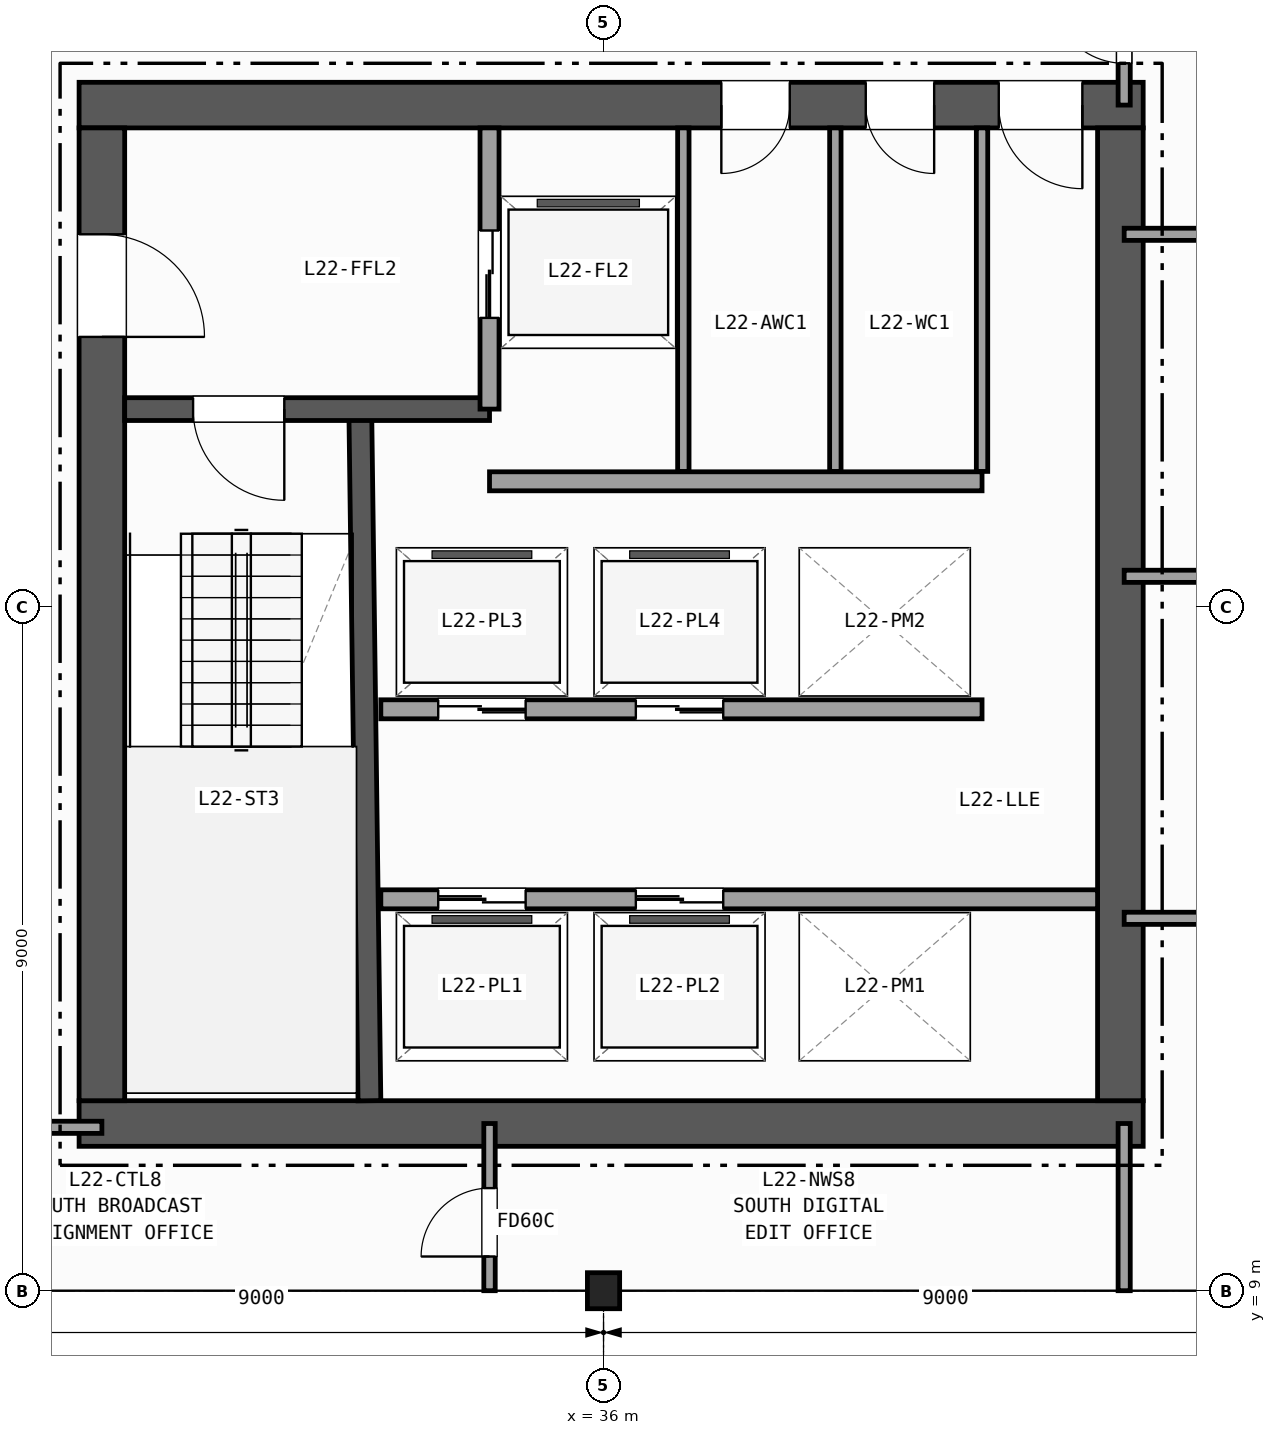
"""IFC4 building model, lengths in metres.
Left out: names, types, materials, properties, quantities, classifications, styles, units other than length and angle.
Written with IfcOpenShell. Run it as: python <this file> out.ifc"""

import sys

from ifc_helpers import new_model, si_unit, direction, frame, frame_2d, origin, origin_2d, place, context, subcontext, project, spatial, rectangle, i_section, extrude, element, fill, save


model = new_model("IFC4")
c1 = context("Model", 3, precision=1e-05, world=origin(), true_north=direction((0.0, 1.0)))
c2 = subcontext(c1, "Body", "Model", "MODEL_VIEW")
j1 = project(units=[si_unit("LENGTHUNIT", "METRE"), si_unit("PLANEANGLEUNIT", "RADIAN")], contexts=[c1])
p1 = place(None, origin())
s1 = spatial("IfcSite", under=j1, at=p1, CompositionType="ELEMENT")
p2 = place(p1, origin())
s2 = spatial("IfcBuilding", under=s1, at=p2, CompositionType="ELEMENT")
p3 = place(p2, frame((0.0, 0.0, 92.8)))
s3 = spatial("IfcBuildingStorey", under=s2, at=p3, CompositionType="ELEMENT", Elevation=92.8)
p4 = place(p3, frame((36.0, 9.0, 0.0), z_axis=(0.0, 0.0, 1.0), x_axis=(1.0, 0.0, 0.0)))
e1 = element("IfcColumn", 1, at=p4, inside=s3, PredefinedType="COLUMN", context=c2, shape_type="SweptSolid", body=[
    extrude(i_section(OverallWidth=0.424, OverallDepth=0.474, WebThickness=0.048, FlangeThickness=0.077, FilletRadius=0.015, at=origin_2d()), origin(), (0.0, 0.0, 1.0), 3.7),
])
p5 = place(p3, frame((29.1, 11.2, 0.0), z_axis=(0.0, 0.0, 1.0), x_axis=(1.0, 0.0, 0.0)))
e2 = element("IfcWall", 2, at=p5, inside=s3, PredefinedType="SHEAR", context=c2, shape_type="SweptSolid", body=[
    extrude(rectangle(XDim=14.0, YDim=0.6, at=frame_2d((7.0, 0.0))), origin(), (0.0, 0.0, 1.0), 3.42),
])
p6 = place(p3, frame((43.1, 24.6, 0.0), z_axis=(0.0, 0.0, 1.0), x_axis=(-1.0, 0.0, 0.0)))
e3 = element("IfcWall", 3, at=p6, inside=s3, PredefinedType="SHEAR", context=c2, shape_type="SweptSolid", body=[
    extrude(rectangle(XDim=14.0, YDim=0.6, at=frame_2d((7.0, 0.0))), origin(), (0.0, 0.0, 1.0), 3.42),
])
p7 = place(p6, frame((0.8, 0.0, 0.0)))
e4 = element("IfcOpeningElement", 4, at=p7, cuts=e3, PredefinedType="OPENING", context=c2, shape_type="SweptSolid", body=[
    extrude(rectangle(XDim=1.1, YDim=2.15, at=frame_2d((0.55, 1.075))), frame((0.0, 0.31, 0.0), z_axis=(0.0, -1.0, 0.0), x_axis=(1.0, 0.0, 0.0)), (0.0, 0.0, 1.0), 0.62),
])
p8 = place(p6, frame((2.75, 0.0, 0.0)))
e5 = element("IfcOpeningElement", 5, at=p8, cuts=e3, PredefinedType="OPENING", context=c2, shape_type="SweptSolid", body=[
    extrude(rectangle(XDim=0.9, YDim=2.1, at=frame_2d((0.45, 1.05))), frame((0.0, 0.31, 0.0), z_axis=(0.0, -1.0, 0.0), x_axis=(1.0, 0.0, 0.0)), (0.0, 0.0, 1.0), 0.62),
])
p9 = place(p6, frame((4.65, 0.0, 0.0)))
e6 = element("IfcOpeningElement", 6, at=p9, cuts=e3, PredefinedType="OPENING", context=c2, shape_type="SweptSolid", body=[
    extrude(rectangle(XDim=0.9, YDim=2.1, at=frame_2d((0.45, 1.05))), frame((0.0, 0.31, 0.0), z_axis=(0.0, -1.0, 0.0), x_axis=(1.0, 0.0, 0.0)), (0.0, 0.0, 1.0), 0.62),
])
p10 = place(p3, frame((29.4, 24.3, 0.0), z_axis=(0.0, 0.0, 1.0), x_axis=(0.0, -1.0, 0.0)))
e7 = element("IfcWall", 7, at=p10, inside=s3, PredefinedType="SHEAR", context=c2, shape_type="SweptSolid", body=[
    extrude(rectangle(XDim=12.8, YDim=0.6, at=frame_2d((6.4, 0.0))), origin(), (0.0, 0.0, 1.0), 3.42),
])
p11 = place(p10, frame((1.4, 0.0, 0.0)))
e8 = element("IfcOpeningElement", 8, at=p11, cuts=e7, PredefinedType="OPENING", context=c2, shape_type="SweptSolid", body=[
    extrude(rectangle(XDim=1.35, YDim=2.15, at=frame_2d((0.675, 1.075))), frame((0.0, 0.31, 0.0), z_axis=(0.0, -1.0, 0.0), x_axis=(1.0, 0.0, 0.0)), (0.0, 0.0, 1.0), 0.62),
])
p12 = place(p3, frame((42.8, 11.5, 0.0), z_axis=(0.0, 0.0, 1.0), x_axis=(0.0, 1.0, 0.0)))
e9 = element("IfcWall", 9, at=p12, inside=s3, PredefinedType="SHEAR", context=c2, shape_type="SweptSolid", body=[
    extrude(rectangle(XDim=12.8, YDim=0.6, at=frame_2d((6.4, 0.0))), origin(), (0.0, 0.0, 1.0), 3.42),
])
p13 = place(p3, frame((32.92, 11.5, 0.0), z_axis=(0.0, 0.0, 1.0), x_axis=(-0.013244407292, 0.999912288991, 0.0)))
e10 = element("IfcWall", 10, at=p13, inside=s3, PredefinedType="SHEAR", context=c2, shape_type="SweptSolid", body=[
    extrude(rectangle(XDim=9.051, YDim=0.3, at=frame_2d((4.525, 0.0))), origin(), (0.0, 0.0, 1.0), 3.42),
])
p14 = place(p3, frame((34.5, 20.6, 0.0), z_axis=(0.0, 0.0, 1.0), x_axis=(-1.0, 0.0, 0.0)))
e11 = element("IfcWall", 11, at=p14, inside=s3, PredefinedType="SHEAR", context=c2, shape_type="SweptSolid", body=[
    extrude(rectangle(XDim=4.8, YDim=0.3, at=frame_2d((2.4, 0.0))), origin(), (0.0, 0.0, 1.0), 3.42),
])
p15 = place(p14, frame((2.7, 0.0, 0.0)))
e12 = element("IfcOpeningElement", 12, at=p15, cuts=e11, PredefinedType="OPENING", context=c2, shape_type="SweptSolid", body=[
    extrude(rectangle(XDim=1.2, YDim=2.15, at=frame_2d((0.6, 1.075))), frame((0.0, 0.16, 0.0), z_axis=(0.0, -1.0, 0.0), x_axis=(1.0, 0.0, 0.0)), (0.0, 0.0, 1.0), 0.32),
])
p16 = place(p3, frame((34.5, 20.6, 0.0), z_axis=(0.0, 0.0, 1.0), x_axis=(0.0, 1.0, 0.0)))
e13 = element("IfcWall", 13, at=p16, inside=s3, PredefinedType="PARTITIONING", context=c2, shape_type="SweptSolid", body=[
    extrude(rectangle(XDim=3.7, YDim=0.25, at=frame_2d((1.85, 0.0))), origin(), (0.0, 0.0, 1.0), 3.42),
])
p17 = place(p16, frame((1.2, 0.0, 0.0)))
e14 = element("IfcOpeningElement", 14, at=p17, cuts=e13, PredefinedType="OPENING", context=c2, shape_type="SweptSolid", body=[
    extrude(rectangle(XDim=1.15, YDim=2.15, at=frame_2d((0.575, 1.075))), frame((0.0, 0.135, 0.0), z_axis=(0.0, -1.0, 0.0), x_axis=(1.0, 0.0, 0.0)), (0.0, 0.0, 1.0), 0.27),
])
p18 = place(p3, frame((34.5, 19.65, 0.0), z_axis=(0.0, 0.0, 1.0), x_axis=(1.0, 0.0, 0.0)))
e15 = element("IfcWall", 15, at=p18, inside=s3, PredefinedType="PARTITIONING", context=c2, shape_type="SweptSolid", body=[
    extrude(rectangle(XDim=6.48, YDim=0.25, at=frame_2d((3.24, 0.0))), origin(), (0.0, 0.0, 1.0), 3.42),
])
p19 = place(p3, frame((33.07, 14.15, 0.0), z_axis=(0.0, 0.0, 1.0), x_axis=(1.0, 0.0, 0.0)))
e16 = element("IfcWall", 16, at=p19, inside=s3, PredefinedType="PARTITIONING", context=c2, shape_type="SweptSolid", body=[
    extrude(rectangle(XDim=9.43, YDim=0.25, at=frame_2d((4.715, 0.0))), origin(), (0.0, 0.0, 1.0), 3.42),
])
p20 = place(p19, frame((0.755, 0.0, 0.0)))
e17 = element("IfcOpeningElement", 17, at=p20, cuts=e16, PredefinedType="OPENING", context=c2, shape_type="SweptSolid", body=[
    extrude(rectangle(XDim=1.15, YDim=2.15, at=frame_2d((0.575, 1.075))), frame((0.0, 0.135, 0.0), z_axis=(0.0, -1.0, 0.0), x_axis=(1.0, 0.0, 0.0)), (0.0, 0.0, 1.0), 0.27),
])
p21 = place(p19, frame((3.355, 0.0, 0.0)))
e18 = element("IfcOpeningElement", 18, at=p21, cuts=e16, PredefinedType="OPENING", context=c2, shape_type="SweptSolid", body=[
    extrude(rectangle(XDim=1.15, YDim=2.15, at=frame_2d((0.575, 1.075))), frame((0.0, 0.135, 0.0), z_axis=(0.0, -1.0, 0.0), x_axis=(1.0, 0.0, 0.0)), (0.0, 0.0, 1.0), 0.27),
])
p22 = place(p3, frame((40.98, 16.65, 0.0), z_axis=(0.0, 0.0, 1.0), x_axis=(-1.0, 0.0, 0.0)))
e19 = element("IfcWall", 19, at=p22, inside=s3, PredefinedType="PARTITIONING", context=c2, shape_type="SweptSolid", body=[
    extrude(rectangle(XDim=7.91, YDim=0.25, at=frame_2d((3.955, 0.0))), origin(), (0.0, 0.0, 1.0), 3.42),
])
p23 = place(p22, frame((6.005, 0.0, 0.0)))
e20 = element("IfcOpeningElement", 20, at=p23, cuts=e19, PredefinedType="OPENING", context=c2, shape_type="SweptSolid", body=[
    extrude(rectangle(XDim=1.15, YDim=2.15, at=frame_2d((0.575, 1.075))), frame((0.0, 0.135, 0.0), z_axis=(0.0, -1.0, 0.0), x_axis=(1.0, 0.0, 0.0)), (0.0, 0.0, 1.0), 0.27),
])
p24 = place(p22, frame((3.405, 0.0, 0.0)))
e21 = element("IfcOpeningElement", 21, at=p24, cuts=e19, PredefinedType="OPENING", context=c2, shape_type="SweptSolid", body=[
    extrude(rectangle(XDim=1.15, YDim=2.15, at=frame_2d((0.575, 1.075))), frame((0.0, 0.135, 0.0), z_axis=(0.0, -1.0, 0.0), x_axis=(1.0, 0.0, 0.0)), (0.0, 0.0, 1.0), 0.27),
])
for number, where, z_axis, x_axis in (
    (22, (37.05, 19.78, 0.0), (0.0, 0.0, 1.0), (0.0, 1.0, 0.0)),
    (23, (39.05, 19.78, 0.0), (0.0, 0.0, 1.0), (0.0, 1.0, 0.0)),
    (24, (40.98, 19.78, 0.0), (0.0, 0.0, 1.0), (0.0, 1.0, 0.0)),
):
    element("IfcWall", number, at=place(p3, frame(where, z_axis=z_axis, x_axis=x_axis)), inside=s3, PredefinedType="PARTITIONING", context=c2, shape_type="SweptSolid", body=[
        extrude(rectangle(XDim=4.52, YDim=0.15, at=frame_2d((2.26, 0.0))), origin(), (0.0, 0.0, 1.0), 3.42),
    ])
p25 = place(p3, frame((24.65, 11.15, 0.0), z_axis=(0.0, 0.0, 1.0), x_axis=(1.0, 0.0, 0.0)))
e25 = element("IfcWall", 25, at=p25, inside=s3, PredefinedType="PARTITIONING", context=c2, shape_type="SweptSolid", body=[
    extrude(rectangle(XDim=4.75, YDim=0.16, at=frame_2d((2.375, 0.0))), origin(), (0.0, 0.0, 1.0), 2.792),
])
p26 = place(p25, frame((1.2, 0.0, 0.0)))
e26 = element("IfcOpeningElement", 26, at=p26, cuts=e25, PredefinedType="OPENING", context=c2, shape_type="SweptSolid", body=[
    extrude(rectangle(XDim=1.2, YDim=2.15, at=frame_2d((0.6, 1.075))), frame((0.0, 0.09, 0.0), z_axis=(0.0, -1.0, 0.0), x_axis=(1.0, 0.0, 0.0)), (0.0, 0.0, 1.0), 0.18),
])
p27 = place(p3, frame((34.5, 9.0, 0.0), z_axis=(0.0, 0.0, 1.0), x_axis=(0.0, 1.0, 0.0)))
e27 = element("IfcWall", 27, at=p27, inside=s3, PredefinedType="PARTITIONING", context=c2, shape_type="SweptSolid", body=[
    extrude(rectangle(XDim=2.2, YDim=0.15, at=frame_2d((1.1, 0.0))), origin(), (0.0, 0.0, 1.0), 2.627),
])
p28 = place(p27, frame((0.45, 0.0, 0.0)))
e28 = element("IfcOpeningElement", 28, at=p28, cuts=e27, PredefinedType="OPENING", context=c2, shape_type="SweptSolid", body=[
    extrude(rectangle(XDim=0.9, YDim=2.1, at=frame_2d((0.45, 1.05))), frame((0.0, 0.085, 0.0), z_axis=(0.0, -1.0, 0.0), x_axis=(1.0, 0.0, 0.0)), (0.0, 0.0, 1.0), 0.17),
])
p29 = place(p3, frame((42.85, 9.0, 0.0), z_axis=(0.0, 0.0, 1.0), x_axis=(0.0, 1.0, 0.0)))
e29 = element("IfcWall", 29, at=p29, inside=s3, PredefinedType="PARTITIONING", context=c2, shape_type="SweptSolid", body=[
    extrude(rectangle(XDim=2.2, YDim=0.16, at=frame_2d((1.1, 0.0))), origin(), (0.0, 0.0, 1.0), 2.627),
])
p30 = place(p3, frame((42.85, 24.6, 0.0), z_axis=(0.0, 0.0, 1.0), x_axis=(0.0, 1.0, 0.0)))
e30 = element("IfcWall", 30, at=p30, inside=s3, PredefinedType="PARTITIONING", context=c2, shape_type="SweptSolid", body=[
    extrude(rectangle(XDim=2.4, YDim=0.16, at=frame_2d((1.2, 0.0))), origin(), (0.0, 0.0, 1.0), 2.627),
])
p31 = place(p30, frame((0.55, 0.0, 0.0)))
e31 = element("IfcOpeningElement", 31, at=p31, cuts=e30, PredefinedType="OPENING", context=c2, shape_type="SweptSolid", body=[
    extrude(rectangle(XDim=0.95, YDim=2.1, at=frame_2d((0.475, 1.05))), frame((0.0, 0.09, 0.0), z_axis=(0.0, -1.0, 0.0), x_axis=(1.0, 0.0, 0.0)), (0.0, 0.0, 1.0), 0.18),
])
p32 = place(p3, frame((42.85, 13.9, 0.0), z_axis=(0.0, 0.0, 1.0), x_axis=(1.0, 0.0, 0.0)))
e32 = element("IfcWall", 32, at=p32, inside=s3, PredefinedType="PARTITIONING", context=c2, shape_type="SweptSolid", body=[
    extrude(rectangle(XDim=20.428, YDim=0.16, at=frame_2d((10.214, 0.0))), origin(), (0.0, 0.0, 1.0), 3.42),
])
p33 = place(p32, frame((4.6, 0.0, 0.0)))
e33 = element("IfcOpeningElement", 33, at=p33, cuts=e32, PredefinedType="OPENING", context=c2, shape_type="SweptSolid", body=[
    extrude(rectangle(XDim=1.0, YDim=2.1, at=frame_2d((0.5, 1.05))), frame((0.0, 0.09, 0.0), z_axis=(0.0, -1.0, 0.0), x_axis=(1.0, 0.0, 0.0)), (0.0, 0.0, 1.0), 0.18),
])
p34 = place(p3, frame((42.85, 18.4, 0.0), z_axis=(0.0, 0.0, 1.0), x_axis=(1.0, 0.0, 0.0)))
e34 = element("IfcWall", 34, at=p34, inside=s3, PredefinedType="PARTITIONING", context=c2, shape_type="SweptSolid", body=[
    extrude(rectangle(XDim=20.809, YDim=0.16, at=frame_2d((10.404, 0.0))), origin(), (0.0, 0.0, 1.0), 3.42),
])
p35 = place(p34, frame((4.6, 0.0, 0.0)))
e35 = element("IfcOpeningElement", 35, at=p35, cuts=e34, PredefinedType="OPENING", context=c2, shape_type="SweptSolid", body=[
    extrude(rectangle(XDim=1.05, YDim=2.15, at=frame_2d((0.525, 1.075))), frame((0.0, 0.09, 0.0), z_axis=(0.0, -1.0, 0.0), x_axis=(1.0, 0.0, 0.0)), (0.0, 0.0, 1.0), 0.18),
])
p36 = place(p3, frame((42.85, 22.9, 0.0), z_axis=(0.0, 0.0, 1.0), x_axis=(1.0, 0.0, 0.0)))
e36 = element("IfcWall", 36, at=p36, inside=s3, PredefinedType="PARTITIONING", context=c2, shape_type="SweptSolid", body=[
    extrude(rectangle(XDim=20.346, YDim=0.16, at=frame_2d((10.173, 0.0))), origin(), (0.0, 0.0, 1.0), 3.42),
])
p37 = place(p36, frame((4.6, 0.0, 0.0)))
e37 = element("IfcOpeningElement", 37, at=p37, cuts=e36, PredefinedType="OPENING", context=c2, shape_type="SweptSolid", body=[
    extrude(rectangle(XDim=1.2, YDim=2.15, at=frame_2d((0.6, 1.075))), frame((0.0, 0.09, 0.0), z_axis=(0.0, -1.0, 0.0), x_axis=(1.0, 0.0, 0.0)), (0.0, 0.0, 1.0), 0.18),
])
p38 = place(p15, origin())
e38 = element("IfcDoor", 38, at=p38, inside=s3, OperationType="SINGLE_SWING_LEFT", PredefinedType="DOOR", context=c2, shape_type="SweptSolid", body=[
    extrude(rectangle(XDim=1.2, YDim=2.15, at=frame_2d((0.6, 1.075))), frame((0.0, 0.025, 0.0), z_axis=(0.0, -1.0, 0.0), x_axis=(1.0, 0.0, 0.0)), (0.0, 0.0, 1.0), 0.05),
])
fill(e12, e38)
p39 = place(p11, origin())
e39 = element("IfcDoor", 39, at=p39, inside=s3, OperationType="SINGLE_SWING_RIGHT", PredefinedType="DOOR", context=c2, shape_type="SweptSolid", body=[
    extrude(rectangle(XDim=1.35, YDim=2.15, at=frame_2d((0.675, 1.075))), frame((0.0, 0.025, 0.0), z_axis=(0.0, -1.0, 0.0), x_axis=(1.0, 0.0, 0.0)), (0.0, 0.0, 1.0), 0.05),
])
fill(e8, e39)
p40 = place(p7, origin())
e40 = element("IfcDoor", 40, at=p40, inside=s3, OperationType="SINGLE_SWING_LEFT", PredefinedType="DOOR", context=c2, shape_type="SweptSolid", body=[
    extrude(rectangle(XDim=1.1, YDim=2.15, at=frame_2d((0.55, 1.075))), frame((0.0, 0.025, 0.0), z_axis=(0.0, -1.0, 0.0), x_axis=(1.0, 0.0, 0.0)), (0.0, 0.0, 1.0), 0.05),
])
fill(e4, e40)
p41 = place(p8, origin())
e41 = element("IfcDoor", 41, at=p41, inside=s3, OperationType="SINGLE_SWING_LEFT", PredefinedType="DOOR", context=c2, shape_type="SweptSolid", body=[
    extrude(rectangle(XDim=0.9, YDim=2.1, at=frame_2d((0.45, 1.05))), frame((0.0, 0.025, 0.0), z_axis=(0.0, -1.0, 0.0), x_axis=(1.0, 0.0, 0.0)), (0.0, 0.0, 1.0), 0.05),
])
fill(e5, e41)
p42 = place(p9, origin())
e42 = element("IfcDoor", 42, at=p42, inside=s3, OperationType="SINGLE_SWING_RIGHT", PredefinedType="DOOR", context=c2, shape_type="SweptSolid", body=[
    extrude(rectangle(XDim=0.9, YDim=2.1, at=frame_2d((0.45, 1.05))), frame((0.0, 0.025, 0.0), z_axis=(0.0, -1.0, 0.0), x_axis=(1.0, 0.0, 0.0)), (0.0, 0.0, 1.0), 0.05),
])
fill(e6, e42)
p43 = place(p17, origin())
e43 = element("IfcDoor", 43, at=p43, inside=s3, OperationType="DOUBLE_DOOR_SLIDING", PredefinedType="DOOR", context=c2, shape_type="SweptSolid", body=[
    extrude(rectangle(XDim=1.15, YDim=2.15, at=frame_2d((0.575, 1.075))), frame((0.0, 0.025, 0.0), z_axis=(0.0, -1.0, 0.0), x_axis=(1.0, 0.0, 0.0)), (0.0, 0.0, 1.0), 0.05),
])
fill(e14, e43)
p44 = place(p20, origin())
e44 = element("IfcDoor", 44, at=p44, inside=s3, OperationType="DOUBLE_DOOR_SLIDING", PredefinedType="DOOR", context=c2, shape_type="SweptSolid", body=[
    extrude(rectangle(XDim=1.15, YDim=2.15, at=frame_2d((0.575, 1.075))), frame((0.0, 0.025, 0.0), z_axis=(0.0, -1.0, 0.0), x_axis=(1.0, 0.0, 0.0)), (0.0, 0.0, 1.0), 0.05),
])
fill(e17, e44)
p45 = place(p21, origin())
e45 = element("IfcDoor", 45, at=p45, inside=s3, OperationType="DOUBLE_DOOR_SLIDING", PredefinedType="DOOR", context=c2, shape_type="SweptSolid", body=[
    extrude(rectangle(XDim=1.15, YDim=2.15, at=frame_2d((0.575, 1.075))), frame((0.0, 0.025, 0.0), z_axis=(0.0, -1.0, 0.0), x_axis=(1.0, 0.0, 0.0)), (0.0, 0.0, 1.0), 0.05),
])
fill(e18, e45)
p46 = place(p23, origin())
e46 = element("IfcDoor", 46, at=p46, inside=s3, OperationType="DOUBLE_DOOR_SLIDING", PredefinedType="DOOR", context=c2, shape_type="SweptSolid", body=[
    extrude(rectangle(XDim=1.15, YDim=2.15, at=frame_2d((0.575, 1.075))), frame((0.0, 0.025, 0.0), z_axis=(0.0, -1.0, 0.0), x_axis=(1.0, 0.0, 0.0)), (0.0, 0.0, 1.0), 0.05),
])
fill(e20, e46)
p47 = place(p24, origin())
e47 = element("IfcDoor", 47, at=p47, inside=s3, OperationType="DOUBLE_DOOR_SLIDING", PredefinedType="DOOR", context=c2, shape_type="SweptSolid", body=[
    extrude(rectangle(XDim=1.15, YDim=2.15, at=frame_2d((0.575, 1.075))), frame((0.0, 0.025, 0.0), z_axis=(0.0, -1.0, 0.0), x_axis=(1.0, 0.0, 0.0)), (0.0, 0.0, 1.0), 0.05),
])
fill(e21, e47)
p48 = place(p28, origin())
e48 = element("IfcDoor", 48, at=p48, inside=s3, OperationType="SINGLE_SWING_LEFT", PredefinedType="DOOR", context=c2, shape_type="SweptSolid", body=[
    extrude(rectangle(XDim=0.9, YDim=2.1, at=frame_2d((0.45, 1.05))), frame((0.0, 0.025, 0.0), z_axis=(0.0, -1.0, 0.0), x_axis=(1.0, 0.0, 0.0)), (0.0, 0.0, 1.0), 0.05),
])
fill(e28, e48)
p49 = place(p31, origin())
e49 = element("IfcDoor", 49, at=p49, inside=s3, OperationType="SINGLE_SWING_RIGHT", PredefinedType="DOOR", context=c2, shape_type="SweptSolid", body=[
    extrude(rectangle(XDim=0.95, YDim=2.1, at=frame_2d((0.475, 1.05))), frame((0.0, 0.025, 0.0), z_axis=(0.0, -1.0, 0.0), x_axis=(1.0, 0.0, 0.0)), (0.0, 0.0, 1.0), 0.05),
])
fill(e31, e49)
save(model, sys.argv[1])
